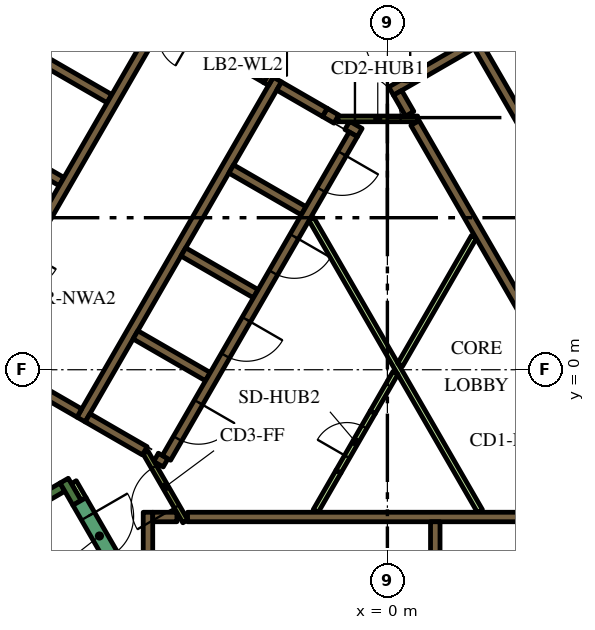
"""IFC4 building model, lengths in metres.
Left out: names, types, materials, properties, quantities, classifications, styles, units other than length and angle.
Written with IfcOpenShell. Run it as: python <this file> out.ifc"""

import sys

from ifc_helpers import new_model, si_unit, direction, frame, frame_2d, origin, place, context, subcontext, project, spatial, polyline, rectangle, outline, extrude, element, fill, save


model = new_model("IFC4")
c1 = context("Model", 3, precision=1e-05, world=origin(), true_north=direction((0.0, 1.0)))
c2 = subcontext(c1, "Body", "Model", "MODEL_VIEW")
j1 = project(units=[si_unit("LENGTHUNIT", "METRE"), si_unit("PLANEANGLEUNIT", "RADIAN")], contexts=[c1])
p1 = place(None, origin())
s1 = spatial("IfcSite", under=j1, at=p1, CompositionType="ELEMENT")
p2 = place(p1, origin())
s2 = spatial("IfcBuilding", under=s1, at=p2, CompositionType="ELEMENT")
p3 = place(p2, frame((0.0, 0.0, 114.9)))
s3 = spatial("IfcBuildingStorey", under=s2, at=p3, CompositionType="ELEMENT", Elevation=114.9)
p4 = place(p3, frame((-15.36, -1.503, 0.0), z_axis=(0.0, 0.0, 1.0), x_axis=(0.50000389221, 0.866023156604, 0.0)))
e1 = element("IfcWall", 1, at=p4, inside=s3, PredefinedType="SOLIDWALL", context=c2, shape_type="SweptSolid", body=[
    extrude(rectangle(XDim=21.0, YDim=0.9, at=frame_2d((10.5, 0.0))), origin(), (0.0, 0.0, 1.0), 3.9),
])
p5 = place(p3, frame((-14.44, -6.49, 0.0), z_axis=(0.0, 0.0, 1.0), x_axis=(0.866022966069, 0.500004222222, 0.0)))
e2 = element("IfcWall", 2, at=p5, inside=s3, PredefinedType="SOLIDWALL", context=c2, shape_type="SweptSolid", body=[
    extrude(rectangle(XDim=6.8, YDim=0.25, at=frame_2d((3.4, 0.0))), origin(), (0.0, 0.0, 1.0), 3.9),
])
p6 = place(p3, frame((-8.168, -3.503, 0.0), z_axis=(0.0, 0.0, 1.0), x_axis=(-0.499952099219, 0.866053057547, 0.0)))
e3 = element("IfcWall", 3, at=p6, inside=s3, PredefinedType="SOLIDWALL", context=c2, shape_type="SweptSolid", body=[
    extrude(rectangle(XDim=0.675, YDim=0.25, at=frame_2d((0.337, 0.0))), origin(), (0.0, 0.0, 1.0), 3.9),
])
p7 = place(p3, frame((-5.259, -3.875, 0.0), z_axis=(0.0, 0.0, 1.0), x_axis=(1.0, 0.0, 0.0)))
e4 = element("IfcWall", 4, at=p7, inside=s3, PredefinedType="SOLIDWALL", context=c2, shape_type="SweptSolid", body=[
    extrude(rectangle(XDim=10.489, YDim=0.25, at=frame_2d((5.244, 0.0))), origin(), (0.0, 0.0, 1.0), 3.9),
])
p8 = place(p3, frame((1.26, -4.0, 0.0), z_axis=(0.0, 0.0, 1.0), x_axis=(0.0, -1.0, 0.0)))
e5 = element("IfcWall", 5, at=p8, inside=s3, PredefinedType="SOLIDWALL", context=c2, shape_type="SweptSolid", body=[
    extrude(rectangle(XDim=2.2, YDim=0.25, at=frame_2d((1.1, 0.0))), origin(), (0.0, 0.0, 1.0), 3.9),
])
p9 = place(p3, frame((-6.3, -3.75, 0.0), z_axis=(0.0, 0.0, 1.0), x_axis=(0.0, -1.0, 0.0)))
e6 = element("IfcWall", 6, at=p9, inside=s3, PredefinedType="SOLIDWALL", context=c2, shape_type="SweptSolid", body=[
    extrude(rectangle(XDim=3.404, YDim=0.25, at=frame_2d((1.702, 0.0))), origin(), (0.0, 0.0, 1.0), 3.9),
])
p10 = place(p3, frame((-6.175, -3.875, 0.0), z_axis=(0.0, 0.0, 1.0), x_axis=(1.0, 0.0, 0.0)))
e7 = element("IfcWall", 7, at=p10, inside=s3, PredefinedType="SOLIDWALL", context=c2, shape_type="SweptSolid", body=[
    extrude(rectangle(XDim=0.637, YDim=0.25, at=frame_2d((0.318, 0.0))), origin(), (0.0, 0.0, 1.0), 3.9),
])
p11 = place(p3, origin())
e8 = element("IfcWall", 8, at=p11, inside=s3, PredefinedType="SOLIDWALL", context=c2, shape_type="SweptSolid", body=[
    extrude(outline(polyline([(2.776, 8.733), (2.499, 8.573), (2.498, 8.573), (2.498, 8.573), (2.282, 8.448), (2.282, 8.448), (0.377, 7.348), (0.16, 7.223), (0.035, 7.439), (3.032, 9.169), (3.03, 9.152), (3.03, 9.133), (3.031, 9.113), (3.035, 9.094), (3.04, 9.075), (3.047, 9.057), (3.056, 9.039), (3.119, 8.931), (2.776, 8.733)])), origin(), (0.0, 0.0, 1.0), 3.9),
])
p12 = place(p3, frame((0.268, 7.285, 0.0), z_axis=(0.0, 0.0, 1.0), x_axis=(0.500098681536, -0.865968422476, 0.0)))
e9 = element("IfcWall", 9, at=p12, inside=s3, PredefinedType="SOLIDWALL", context=c2, shape_type="SweptSolid", body=[
    extrude(rectangle(XDim=0.636, YDim=0.25, at=frame_2d((0.318, 0.0))), origin(), (0.0, 0.0, 1.0), 3.9),
])
p13 = place(p3, frame((5.97, -2.591, 0.0), z_axis=(0.0, 0.0, 1.0), x_axis=(-0.499994469932, 0.866028596547, 0.0)))
e10 = element("IfcWall", 10, at=p13, inside=s3, PredefinedType="SOLIDWALL", context=c2, shape_type="SweptSolid", body=[
    extrude(rectangle(XDim=10.488, YDim=0.25, at=frame_2d((5.244, 0.0))), origin(), (0.0, 0.0, 1.0), 3.9),
])
p14 = place(p3, frame((-8.06, -1.311, 0.0), z_axis=(0.0, 0.0, 1.0), x_axis=(0.50000273126, 0.866023826885, 0.0)))
e11 = element("IfcWall", 11, at=p14, inside=s3, PredefinedType="SOLIDWALL", context=c2, shape_type="SweptSolid", body=[
    extrude(rectangle(XDim=10.33, YDim=0.25, at=frame_2d((5.165, 0.0))), origin(), (0.0, 0.0, 1.0), 3.9),
])
p15 = place(p3, frame((-1.342, 6.595, 0.0), z_axis=(0.0, 0.0, 1.0), x_axis=(-0.866046247233, 0.49996389635, 0.0)))
e12 = element("IfcWall", 12, at=p15, inside=s3, PredefinedType="SOLIDWALL", context=c2, shape_type="SweptSolid", body=[
    extrude(rectangle(XDim=0.35, YDim=0.25, at=frame_2d((0.175, 0.0))), origin(), (0.0, 0.0, 1.0), 3.9),
])
p16 = place(p3, frame((-1.647, 6.771, 0.0), z_axis=(0.0, 0.0, 1.0), x_axis=(-0.865971728693, 0.500092956464, 0.0)))
e13 = element("IfcWall", 13, at=p16, inside=s3, PredefinedType="SOLIDWALL", context=c2, shape_type="SweptSolid", body=[
    extrude(rectangle(XDim=1.388, YDim=0.25, at=frame_2d((0.694, 0.0))), origin(), (0.0, 0.0, 1.0), 3.9),
])
p17 = place(p3, frame((-0.728, 6.24, 0.0), z_axis=(0.0, 0.0, 1.0), x_axis=(-0.866088799389, 0.499890179513, 0.0)))
e14 = element("IfcWall", 14, at=p17, inside=s3, PredefinedType="SOLIDWALL", context=c2, shape_type="SweptSolid", body=[
    extrude(rectangle(XDim=0.378, YDim=0.25, at=frame_2d((0.189, 0.0))), origin(), (0.0, 0.0, 1.0), 3.9),
])
for number, where, z_axis, x_axis in (
    (15, (-2.204, 4.182, 0.0), (0.0, 0.0, 1.0), (-0.866, 0.5, 0.0)),
    (16, (-5.369, 3.1, 0.0), (0.0, 0.0, 1.0), (0.866, -0.5, 0.0)),
    (17, (-4.724, -0.182, 0.0), (0.0, 0.0, 1.0), (-0.866, 0.5, 0.0)),
):
    element("IfcWall", number, at=place(p3, frame(where, z_axis=z_axis, x_axis=x_axis)), inside=s3, PredefinedType="SOLIDWALL", context=c2, shape_type="SweptSolid", body=[
        extrude(rectangle(XDim=2.2, YDim=0.25, at=frame_2d((1.1, 0.0))), origin(), (0.0, 0.0, 1.0), 3.9),
    ])
p18 = place(p3, frame((-6.088, -2.305, 0.0), z_axis=(0.0, 0.0, 1.0), x_axis=(0.866059450854, -0.499941024108, 0.0)))
e18 = element("IfcWall", 18, at=p18, inside=s3, PredefinedType="SOLIDWALL", context=c2, shape_type="SweptSolid", body=[
    extrude(rectangle(XDim=0.29, YDim=0.25, at=frame_2d((0.145, 0.0))), origin(), (0.0, 0.0, 1.0), 3.9),
])
p19 = place(p3, frame((-7.889, -1.265, 0.0), z_axis=(0.0, 0.0, 1.0), x_axis=(0.865986741702, -0.500066958712, 0.0)))
e19 = element("IfcWall", 19, at=p19, inside=s3, PredefinedType="SOLIDWALL", context=c2, shape_type="SweptSolid", body=[
    extrude(rectangle(XDim=1.738, YDim=0.25, at=frame_2d((0.869, 0.0))), origin(), (0.0, 0.0, 1.0), 3.9),
])
p20 = place(p3, frame((-8.106, -1.14, 0.0), z_axis=(0.0, 0.0, 1.0), x_axis=(-0.866000643155, 0.500042884217, 0.0)))
e20 = element("IfcWall", 20, at=p20, inside=s3, PredefinedType="SOLIDWALL", context=c2, shape_type="SweptSolid", body=[
    extrude(rectangle(XDim=5.65, YDim=0.25, at=frame_2d((2.825, 0.0))), origin(), (0.0, 0.0, 1.0), 3.9),
])
e21 = element("IfcWall", 21, at=p11, inside=s3, PredefinedType="SOLIDWALL", context=c2, shape_type="SweptSolid", body=[
    extrude(outline(polyline([(-3.128, 7.481), (-3.259, 7.557), (-3.134, 7.773), (-3.003, 7.698), (-3.128, 7.481)])), origin(), (0.0, 0.0, 1.0), 3.9),
])
for number, where, z_axis, x_axis in (
    (22, (-8.574, 4.95, 0.0), (0.0, 0.0, 1.0), (-0.866, 0.5, 0.0)),
    (23, (-7.314, 7.132, 0.0), (0.0, 0.0, 1.0), (-0.866, 0.5, 0.0)),
):
    element("IfcWall", number, at=place(p3, frame(where, z_axis=z_axis, x_axis=x_axis)), inside=s3, PredefinedType="SOLIDWALL", context=c2, shape_type="SweptSolid", body=[
        extrude(rectangle(XDim=2.2, YDim=0.25, at=frame_2d((1.1, 0.0))), origin(), (0.0, 0.0, 1.0), 3.9),
    ])
p21 = place(p3, frame((-4.409, 8.365, 0.0), z_axis=(0.0, 0.0, 1.0), x_axis=(-0.866057014183, 0.499945245186, 0.0)))
e24 = element("IfcWall", 24, at=p21, inside=s3, PredefinedType="SOLIDWALL", context=c2, shape_type="SweptSolid", body=[
    extrude(rectangle(XDim=0.379, YDim=0.25, at=frame_2d((0.19, 0.0))), origin(), (0.0, 0.0, 1.0), 3.9),
])
p22 = place(p3, frame((-1.887, -3.718, 0.0), z_axis=(0.0, 0.0, 1.0), x_axis=(0.500057179532, 0.865992388649, 0.0)))
e25 = element("IfcWall", 25, at=p22, inside=s3, PredefinedType="PARTITIONING", context=c2, shape_type="SweptSolid", body=[
    extrude(rectangle(XDim=1.199, YDim=0.15, at=frame_2d((0.6, 0.0))), origin(), (0.0, 0.0, 1.0), 2.75),
])
p23 = place(p3, frame((-8.252, -2.958, 0.0), z_axis=(0.0, 0.0, 1.0), x_axis=(0.500174715838, -0.865924508047, 0.0)))
e26 = element("IfcWall", 26, at=p23, inside=s3, PredefinedType="PARTITIONING", context=c2, shape_type="SweptSolid", body=[
    extrude(rectangle(XDim=0.514, YDim=0.15, at=frame_2d((0.257, 0.0))), origin(), (0.0, 0.0, 1.0), 2.75),
])
p24 = place(p3, frame((2.435, -3.718, 0.0), z_axis=(0.0, 0.0, 1.0), x_axis=(-0.499985176046, 0.866033962229, 0.0)))
e27 = element("IfcWall", 27, at=p24, inside=s3, PredefinedType="PARTITIONING", context=c2, shape_type="SweptSolid", body=[
    extrude(rectangle(XDim=8.875, YDim=0.15, at=frame_2d((4.438, 0.0))), origin(), (0.0, 0.0, 1.0), 2.75),
])
p25 = place(p3, frame((0.336, 0.132, 0.0), z_axis=(0.0, 0.0, 1.0), x_axis=(0.500001957507, 0.866024273614, 0.0)))
e28 = element("IfcWall", 28, at=p25, inside=s3, PredefinedType="PARTITIONING", context=c2, shape_type="SweptSolid", body=[
    extrude(rectangle(XDim=3.881, YDim=0.15, at=frame_2d((1.941, 0.0))), origin(), (0.0, 0.0, 1.0), 2.75),
])
p26 = place(p3, frame((-0.387, -1.121, 0.0), z_axis=(0.0, 0.0, 1.0), x_axis=(0.500057179532, 0.865992388649, 0.0)))
e29 = element("IfcWall", 29, at=p26, inside=s3, PredefinedType="PARTITIONING", context=c2, shape_type="SweptSolid", body=[
    extrude(rectangle(XDim=1.199, YDim=0.15, at=frame_2d((0.6, 0.0))), origin(), (0.0, 0.0, 1.0), 2.75),
])
p27 = place(p3, frame((8.565, -2.185, 0.0), z_axis=(0.0, 0.0, 1.0), x_axis=(-0.499997954832, 0.866026584559, 0.0)))
e30 = element("IfcWall", 30, at=p27, inside=s3, PredefinedType="SOLIDWALL", context=c2, shape_type="SweptSolid", body=[
    extrude(rectangle(XDim=12.35, YDim=0.25, at=frame_2d((6.175, 0.0))), origin(), (0.0, 0.0, 1.0), 3.9),
])
p28 = place(p27, frame((5.725, 0.0, 0.0)))
e31 = element("IfcOpeningElement", 31, at=p28, cuts=e30, PredefinedType="OPENING", context=c2, shape_type="SweptSolid", body=[
    extrude(rectangle(XDim=0.9, YDim=2.1, at=frame_2d((0.45, 1.05))), frame((0.0, 0.135, 0.0), z_axis=(0.0, -1.0, 0.0), x_axis=(1.0, 0.0, 0.0)), (0.0, 0.0, 1.0), 0.27),
])
p29 = place(p3, frame((-6.008, 9.144, 0.0), z_axis=(0.0, 0.0, 1.0), x_axis=(-0.500006956611, -0.866021387346, 0.0)))
e32 = element("IfcWall", 32, at=p29, inside=s3, PredefinedType="SOLIDWALL", context=c2, shape_type="SweptSolid", body=[
    extrude(rectangle(XDim=9.83, YDim=0.25, at=frame_2d((4.915, 0.0))), origin(), (0.0, 0.0, 1.0), 3.9),
])
p30 = place(p29, frame((6.985, 0.0, 0.0)))
e33 = element("IfcOpeningElement", 33, at=p30, cuts=e32, PredefinedType="OPENING", context=c2, shape_type="SweptSolid", body=[
    extrude(rectangle(XDim=0.9, YDim=2.1, at=frame_2d((0.45, 1.05))), frame((0.0, 0.135, 0.0), z_axis=(0.0, -1.0, 0.0), x_axis=(1.0, 0.0, 0.0)), (0.0, 0.0, 1.0), 0.27),
])
p31 = place(p3, frame((-0.898, 6.194, 0.0), z_axis=(0.0, 0.0, 1.0), x_axis=(-0.499996202215, -0.866027596426, 0.0)))
e34 = element("IfcWall", 34, at=p31, inside=s3, PredefinedType="SOLIDWALL", context=c2, shape_type="SweptSolid", body=[
    extrude(rectangle(XDim=9.83, YDim=0.25, at=frame_2d((4.915, 0.0))), origin(), (0.0, 0.0, 1.0), 3.9),
])
p32 = place(p31, frame((0.585, 0.0, 0.0)))
e35 = element("IfcOpeningElement", 35, at=p32, cuts=e34, PredefinedType="OPENING", context=c2, shape_type="SweptSolid", body=[
    extrude(rectangle(XDim=1.1, YDim=2.1, at=frame_2d((0.55, 1.05))), frame((0.0, 0.135, 0.0), z_axis=(0.0, -1.0, 0.0), x_axis=(1.0, 0.0, 0.0)), (0.0, 0.0, 1.0), 0.27),
])
p33 = place(p31, frame((3.105, 0.0, 0.0)))
e36 = element("IfcOpeningElement", 36, at=p33, cuts=e34, PredefinedType="OPENING", context=c2, shape_type="SweptSolid", body=[
    extrude(rectangle(XDim=1.1, YDim=2.1, at=frame_2d((0.55, 1.05))), frame((0.0, 0.135, 0.0), z_axis=(0.0, -1.0, 0.0), x_axis=(1.0, 0.0, 0.0)), (0.0, 0.0, 1.0), 0.27),
])
p34 = place(p31, frame((5.625, 0.0, 0.0)))
e37 = element("IfcOpeningElement", 37, at=p34, cuts=e34, PredefinedType="OPENING", context=c2, shape_type="SweptSolid", body=[
    extrude(rectangle(XDim=1.1, YDim=2.1, at=frame_2d((0.55, 1.05))), frame((0.0, 0.135, 0.0), z_axis=(0.0, -1.0, 0.0), x_axis=(1.0, 0.0, 0.0)), (0.0, 0.0, 1.0), 0.27),
])
p35 = place(p31, frame((8.145, 0.0, 0.0)))
e38 = element("IfcOpeningElement", 38, at=p35, cuts=e34, PredefinedType="OPENING", context=c2, shape_type="SweptSolid", body=[
    extrude(rectangle(XDim=1.1, YDim=2.1, at=frame_2d((0.55, 1.05))), frame((0.0, 0.135, 0.0), z_axis=(0.0, -1.0, 0.0), x_axis=(1.0, 0.0, 0.0)), (0.0, 0.0, 1.0), 0.27),
])
p36 = place(p3, frame((-8.103, -3.466, 0.0), z_axis=(0.0, 0.0, 1.0), x_axis=(0.500078061341, -0.865980330357, 0.0)))
e39 = element("IfcWall", 39, at=p36, inside=s3, PredefinedType="SOLIDWALL", context=c2, shape_type="SweptSolid", body=[
    extrude(rectangle(XDim=2.1, YDim=0.4, at=frame_2d((1.05, 0.0))), origin(), (0.0, 0.0, 1.0), 3.9),
])
p37 = place(p36, frame((0.45, 0.0, 0.0)))
e40 = element("IfcOpeningElement", 40, at=p37, cuts=e39, PredefinedType="OPENING", context=c2, shape_type="SweptSolid", body=[
    extrude(rectangle(XDim=1.2, YDim=2.1, at=frame_2d((0.6, 1.05))), frame((0.0, 0.21, 0.0), z_axis=(0.0, -1.0, 0.0), x_axis=(1.0, 0.0, 0.0)), (0.0, 0.0, 1.0), 0.42),
])
p38 = place(p3, frame((-1.303, 6.6, 0.0), z_axis=(0.0, 0.0, 1.0), x_axis=(1.0, 0.0, 0.0)))
e41 = element("IfcWall", 41, at=p38, inside=s3, PredefinedType="PARTITIONING", context=c2, shape_type="SweptSolid", body=[
    extrude(rectangle(XDim=2.1, YDim=0.15, at=frame_2d((1.05, 0.0))), origin(), (0.0, 0.0, 1.0), 3.9),
])
p39 = place(p38, frame((0.45, 0.0, 0.0)))
e42 = element("IfcOpeningElement", 42, at=p39, cuts=e41, PredefinedType="OPENING", context=c2, shape_type="SweptSolid", body=[
    extrude(rectangle(XDim=1.2, YDim=2.1, at=frame_2d((0.6, 1.05))), frame((0.0, 0.085, 0.0), z_axis=(0.0, -1.0, 0.0), x_axis=(1.0, 0.0, 0.0)), (0.0, 0.0, 1.0), 0.17),
])
p40 = place(p3, frame((-5.317, -3.99, 0.0), z_axis=(0.0, 0.0, 1.0), x_axis=(-0.500027713859, 0.866009402589, 0.0)))
e43 = element("IfcWall", 43, at=p40, inside=s3, PredefinedType="PARTITIONING", context=c2, shape_type="SweptSolid", body=[
    extrude(rectangle(XDim=2.1, YDim=0.15, at=frame_2d((1.05, 0.0))), origin(), (0.0, 0.0, 1.0), 3.9),
])
p41 = place(p40, frame((0.45, 0.0, 0.0)))
e44 = element("IfcOpeningElement", 44, at=p41, cuts=e43, PredefinedType="OPENING", context=c2, shape_type="SweptSolid", body=[
    extrude(rectangle(XDim=1.2, YDim=2.1, at=frame_2d((0.6, 1.05))), frame((0.0, 0.085, 0.0), z_axis=(0.0, -1.0, 0.0), x_axis=(1.0, 0.0, 0.0)), (0.0, 0.0, 1.0), 0.17),
])
p42 = place(p3, frame((-4.409, 8.365, 0.0), z_axis=(0.0, 0.0, 1.0), x_axis=(0.866034573852, -0.49998411664, 0.0)))
e45 = element("IfcWall", 45, at=p42, inside=s3, PredefinedType="SOLIDWALL", context=c2, shape_type="SweptSolid", body=[
    extrude(rectangle(XDim=1.4, YDim=0.25, at=frame_2d((0.7, 0.0))), origin(), (0.0, 0.0, 1.0), 3.9),
])
p43 = place(p42, frame((0.1, 0.0, 0.0)))
e46 = element("IfcOpeningElement", 46, at=p43, cuts=e45, PredefinedType="OPENING", context=c2, shape_type="SweptSolid", body=[
    extrude(rectangle(XDim=1.2, YDim=2.1, at=frame_2d((0.6, 1.05))), frame((0.0, 0.135, 0.0), z_axis=(0.0, -1.0, 0.0), x_axis=(1.0, 0.0, 0.0)), (0.0, 0.0, 1.0), 0.27),
])
p44 = place(p3, frame((-1.287, -2.679, 0.0), z_axis=(0.0, 0.0, 1.0), x_axis=(0.499961193289, 0.866047807691, 0.0)))
e47 = element("IfcWall", 47, at=p44, inside=s3, PredefinedType="PARTITIONING", context=c2, shape_type="SweptSolid", body=[
    extrude(rectangle(XDim=1.8, YDim=0.15, at=frame_2d((0.9, 0.0))), origin(), (0.0, 0.0, 1.0), 2.75),
])
p45 = place(p44, frame((0.45, 0.0, 0.0)))
e48 = element("IfcOpeningElement", 48, at=p45, cuts=e47, PredefinedType="OPENING", context=c2, shape_type="SweptSolid", body=[
    extrude(rectangle(XDim=0.9, YDim=2.1, at=frame_2d((0.45, 1.05))), frame((0.0, 0.085, 0.0), z_axis=(0.0, -1.0, 0.0), x_axis=(1.0, 0.0, 0.0)), (0.0, 0.0, 1.0), 0.17),
])
p46 = place(p3, frame((-19.081, -3.9, 0.0), z_axis=(0.0, 0.0, 1.0), x_axis=(0.499998313975, 0.866026377209, 0.0)))
e49 = element("IfcWall", 49, at=p46, inside=s3, PredefinedType="PARTITIONING", context=c2, shape_type="SweptSolid", body=[
    extrude(rectangle(XDim=25.766, YDim=0.15, at=frame_2d((12.883, 0.0))), origin(), (0.0, 0.0, 1.0), 2.75),
])
p47 = place(p46, frame((19.306, 0.0, 0.0)))
e50 = element("IfcOpeningElement", 50, at=p47, cuts=e49, PredefinedType="OPENING", context=c2, shape_type="SweptSolid", body=[
    extrude(rectangle(XDim=1.0, YDim=2.1, at=frame_2d((0.5, 1.05))), frame((0.0, 0.085, 0.0), z_axis=(0.0, -1.0, 0.0), x_axis=(1.0, 0.0, 0.0)), (0.0, 0.0, 1.0), 0.17),
])
p48 = place(p46, frame((18.0, 0.0, 0.0)))
e51 = element("IfcOpeningElement", 51, at=p48, cuts=e49, PredefinedType="OPENING", context=c2, shape_type="SweptSolid", body=[
    extrude(rectangle(XDim=1.0, YDim=2.1, at=frame_2d((0.5, 1.05))), frame((0.0, 0.085, 0.0), z_axis=(0.0, -1.0, 0.0), x_axis=(1.0, 0.0, 0.0)), (0.0, 0.0, 1.0), 0.17),
])
p49 = place(p46, frame((6.838, 0.0, 0.0)))
e52 = element("IfcOpeningElement", 52, at=p49, cuts=e49, PredefinedType="OPENING", context=c2, shape_type="SweptSolid", body=[
    extrude(rectangle(XDim=1.0, YDim=2.1, at=frame_2d((0.5, 1.05))), frame((0.0, 0.085, 0.0), z_axis=(0.0, -1.0, 0.0), x_axis=(1.0, 0.0, 0.0)), (0.0, 0.0, 1.0), 0.17),
])
p50 = place(p46, frame((4.674, 0.0, 0.0)))
e53 = element("IfcOpeningElement", 53, at=p50, cuts=e49, PredefinedType="OPENING", context=c2, shape_type="SweptSolid", body=[
    extrude(rectangle(XDim=0.9, YDim=2.1, at=frame_2d((0.45, 1.05))), frame((0.0, 0.085, 0.0), z_axis=(0.0, -1.0, 0.0), x_axis=(1.0, 0.0, 0.0)), (0.0, 0.0, 1.0), 0.17),
])
p51 = place(p46, frame((0.18, 0.0, 0.0)))
e54 = element("IfcOpeningElement", 54, at=p51, cuts=e49, PredefinedType="OPENING", context=c2, shape_type="SweptSolid", body=[
    extrude(rectangle(XDim=1.0, YDim=2.1, at=frame_2d((0.5, 1.05))), frame((0.0, 0.085, 0.0), z_axis=(0.0, -1.0, 0.0), x_axis=(1.0, 0.0, 0.0)), (0.0, 0.0, 1.0), 0.17),
])
p52 = place(p32, origin())
e55 = element("IfcDoor", 55, at=p52, inside=s3, OperationType="DOUBLE_DOOR_SLIDING", PredefinedType="DOOR", context=c2, shape_type="SweptSolid", body=[
    extrude(rectangle(XDim=1.1, YDim=2.1, at=frame_2d((0.55, 1.05))), frame((0.0, 0.025, 0.0), z_axis=(0.0, -1.0, 0.0), x_axis=(1.0, 0.0, 0.0)), (0.0, 0.0, 1.0), 0.05),
])
fill(e35, e55)
p53 = place(p33, origin())
e56 = element("IfcDoor", 56, at=p53, inside=s3, OperationType="DOUBLE_DOOR_SLIDING", PredefinedType="DOOR", context=c2, shape_type="SweptSolid", body=[
    extrude(rectangle(XDim=1.1, YDim=2.1, at=frame_2d((0.55, 1.05))), frame((0.0, 0.025, 0.0), z_axis=(0.0, -1.0, 0.0), x_axis=(1.0, 0.0, 0.0)), (0.0, 0.0, 1.0), 0.05),
])
fill(e36, e56)
p54 = place(p34, origin())
e57 = element("IfcDoor", 57, at=p54, inside=s3, OperationType="DOUBLE_DOOR_SLIDING", PredefinedType="DOOR", context=c2, shape_type="SweptSolid", body=[
    extrude(rectangle(XDim=1.1, YDim=2.1, at=frame_2d((0.55, 1.05))), frame((0.0, 0.025, 0.0), z_axis=(0.0, -1.0, 0.0), x_axis=(1.0, 0.0, 0.0)), (0.0, 0.0, 1.0), 0.05),
])
fill(e37, e57)
p55 = place(p35, origin())
e58 = element("IfcDoor", 58, at=p55, inside=s3, OperationType="DOUBLE_DOOR_SLIDING", PredefinedType="DOOR", context=c2, shape_type="SweptSolid", body=[
    extrude(rectangle(XDim=1.1, YDim=2.1, at=frame_2d((0.55, 1.05))), frame((0.0, 0.025, 0.0), z_axis=(0.0, -1.0, 0.0), x_axis=(1.0, 0.0, 0.0)), (0.0, 0.0, 1.0), 0.05),
])
fill(e38, e58)
p56 = place(p37, origin())
e59 = element("IfcDoor", 59, at=p56, inside=s3, OperationType="SINGLE_SWING_LEFT", PredefinedType="DOOR", context=c2, shape_type="SweptSolid", body=[
    extrude(rectangle(XDim=1.2, YDim=2.1, at=frame_2d((0.6, 1.05))), frame((0.0, 0.025, 0.0), z_axis=(0.0, -1.0, 0.0), x_axis=(1.0, 0.0, 0.0)), (0.0, 0.0, 1.0), 0.05),
])
fill(e40, e59)
p57 = place(p39, origin())
e60 = element("IfcDoor", 60, at=p57, inside=s3, OperationType="SINGLE_SWING_LEFT", PredefinedType="DOOR", context=c2, shape_type="SweptSolid", body=[
    extrude(rectangle(XDim=1.2, YDim=2.1, at=frame_2d((0.6, 1.05))), frame((0.0, 0.025, 0.0), z_axis=(0.0, -1.0, 0.0), x_axis=(1.0, 0.0, 0.0)), (0.0, 0.0, 1.0), 0.05),
])
fill(e42, e60)
p58 = place(p41, origin())
e61 = element("IfcDoor", 61, at=p58, inside=s3, OperationType="SINGLE_SWING_LEFT", PredefinedType="DOOR", context=c2, shape_type="SweptSolid", body=[
    extrude(rectangle(XDim=1.2, YDim=2.1, at=frame_2d((0.6, 1.05))), frame((0.0, 0.025, 0.0), z_axis=(0.0, -1.0, 0.0), x_axis=(1.0, 0.0, 0.0)), (0.0, 0.0, 1.0), 0.05),
])
fill(e44, e61)
p59 = place(p43, origin())
e62 = element("IfcDoor", 62, at=p59, inside=s3, OperationType="SINGLE_SWING_LEFT", PredefinedType="DOOR", context=c2, shape_type="SweptSolid", body=[
    extrude(rectangle(XDim=1.2, YDim=2.1, at=frame_2d((0.6, 1.05))), frame((0.0, 0.025, 0.0), z_axis=(0.0, -1.0, 0.0), x_axis=(1.0, 0.0, 0.0)), (0.0, 0.0, 1.0), 0.05),
])
fill(e46, e62)
p60 = place(p45, origin())
e63 = element("IfcDoor", 63, at=p60, inside=s3, OperationType="SINGLE_SWING_LEFT", PredefinedType="DOOR", context=c2, shape_type="SweptSolid", body=[
    extrude(rectangle(XDim=0.9, YDim=2.1, at=frame_2d((0.45, 1.05))), frame((0.0, 0.025, 0.0), z_axis=(0.0, -1.0, 0.0), x_axis=(1.0, 0.0, 0.0)), (0.0, 0.0, 1.0), 0.05),
])
fill(e48, e63)
save(model, sys.argv[1])
